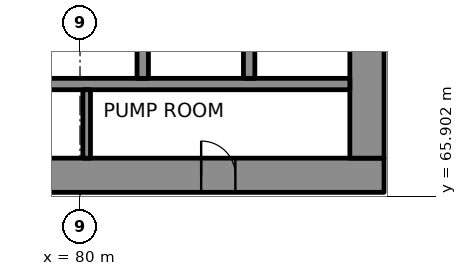
"""IFC4 building model, lengths in metres.
Left out: names, types, materials, properties, quantities, classifications, styles, units other than length and angle.
Written with IfcOpenShell. Run it as: python <this file> out.ifc"""

import sys

from ifc_helpers import new_model, si_unit, direction, frame, frame_2d, origin, place, context, subcontext, project, spatial, rectangle, extrude, element, fill, save


model = new_model("IFC4")
c1 = context("Model", 3, precision=1e-05, world=origin(), true_north=direction((0.0, 1.0)))
c2 = subcontext(c1, "Body", "Model", "MODEL_VIEW")
j1 = project(units=[si_unit("LENGTHUNIT", "METRE"), si_unit("PLANEANGLEUNIT", "RADIAN")], contexts=[c1])
p1 = place(None, origin())
s1 = spatial("IfcSite", under=j1, at=p1, CompositionType="ELEMENT")
p2 = place(p1, origin())
s2 = spatial("IfcBuilding", under=s1, at=p2, CompositionType="ELEMENT")
p3 = place(p2, frame((0.0, 0.0, 8.0)))
s3 = spatial("IfcBuildingStorey", under=s2, at=p3, CompositionType="ELEMENT", Elevation=8.0)
p4 = place(p3, frame((62.0, 66.45, 0.0), z_axis=(0.0, 0.0, 1.0), x_axis=(1.0, 0.0, 0.0)))
e1 = element("IfcWall", 1, at=p4, inside=s3, PredefinedType="SHEAR", context=c2, shape_type="SweptSolid", body=[
    extrude(rectangle(XDim=26.0, YDim=0.9, at=frame_2d((13.0, 0.0))), origin(), (0.0, 0.0, 1.0), 4.3),
])
p5 = place(p4, frame((3.45, 0.0, 0.0)))
e2 = element("IfcOpeningElement", 2, at=p5, cuts=e1, PredefinedType="OPENING", context=c2, shape_type="SweptSolid", body=[
    extrude(rectangle(XDim=0.9, YDim=2.1, at=frame_2d((0.45, 1.05))), frame((0.0, 0.46, 0.0), z_axis=(0.0, -1.0, 0.0), x_axis=(1.0, 0.0, 0.0)), (0.0, 0.0, 1.0), 0.92),
])
p6 = place(p4, frame((6.425, 0.0, 0.0)))
e3 = element("IfcOpeningElement", 3, at=p6, cuts=e1, PredefinedType="OPENING", context=c2, shape_type="SweptSolid", body=[
    extrude(rectangle(XDim=0.9, YDim=2.1, at=frame_2d((0.45, 1.05))), frame((0.0, 0.46, 0.0), z_axis=(0.0, -1.0, 0.0), x_axis=(1.0, 0.0, 0.0)), (0.0, 0.0, 1.0), 0.92),
])
p7 = place(p4, frame((9.4, 0.0, 0.0)))
e4 = element("IfcOpeningElement", 4, at=p7, cuts=e1, PredefinedType="OPENING", context=c2, shape_type="SweptSolid", body=[
    extrude(rectangle(XDim=0.9, YDim=2.1, at=frame_2d((0.45, 1.05))), frame((0.0, 0.46, 0.0), z_axis=(0.0, -1.0, 0.0), x_axis=(1.0, 0.0, 0.0)), (0.0, 0.0, 1.0), 0.92),
])
p8 = place(p4, frame((14.262, 0.0, 0.0)))
e5 = element("IfcOpeningElement", 5, at=p8, cuts=e1, PredefinedType="OPENING", context=c2, shape_type="SweptSolid", body=[
    extrude(rectangle(XDim=0.9, YDim=2.1, at=frame_2d((0.45, 1.05))), frame((0.0, 0.46, 0.0), z_axis=(0.0, -1.0, 0.0), x_axis=(1.0, 0.0, 0.0)), (0.0, 0.0, 1.0), 0.92),
])
p9 = place(p4, frame((21.188, 0.0, 0.0)))
e6 = element("IfcOpeningElement", 6, at=p9, cuts=e1, PredefinedType="OPENING", context=c2, shape_type="SweptSolid", body=[
    extrude(rectangle(XDim=0.9, YDim=2.1, at=frame_2d((0.45, 1.05))), frame((0.0, 0.46, 0.0), z_axis=(0.0, -1.0, 0.0), x_axis=(1.0, 0.0, 0.0)), (0.0, 0.0, 1.0), 0.92),
])
p10 = place(p3, frame((87.55, 66.9, 0.0), z_axis=(0.0, 0.0, 1.0), x_axis=(0.0, 1.0, 0.0)))
e7 = element("IfcWall", 7, at=p10, inside=s3, PredefinedType="SHEAR", context=c2, shape_type="SweptSolid", body=[
    extrude(rectangle(XDim=16.2, YDim=0.9, at=frame_2d((8.1, 0.0))), origin(), (0.0, 0.0, 1.0), 4.3),
])
p11 = place(p10, frame((5.5, 0.0, 0.0)))
e8 = element("IfcOpeningElement", 8, at=p11, cuts=e7, PredefinedType="OPENING", context=c2, shape_type="SweptSolid", body=[
    extrude(rectangle(XDim=1.8, YDim=2.1, at=frame_2d((0.9, 1.05))), frame((0.0, 0.46, 0.0), z_axis=(0.0, -1.0, 0.0), x_axis=(1.0, 0.0, 0.0)), (0.0, 0.0, 1.0), 0.92),
])
p12 = place(p10, frame((11.738, 0.0, 0.0)))
e9 = element("IfcOpeningElement", 9, at=p12, cuts=e7, PredefinedType="OPENING", context=c2, shape_type="SweptSolid", body=[
    extrude(rectangle(XDim=0.9, YDim=2.1, at=frame_2d((0.45, 1.05))), frame((0.0, 0.46, 0.0), z_axis=(0.0, -1.0, 0.0), x_axis=(1.0, 0.0, 0.0)), (0.0, 0.0, 1.0), 0.92),
])
p13 = place(p3, frame((70.35, 68.85, 0.0), z_axis=(0.0, 0.0, 1.0), x_axis=(1.0, 0.0, 0.0)))
e10 = element("IfcWall", 10, at=p13, inside=s3, PredefinedType="SHEAR", context=c2, shape_type="SweptSolid", body=[
    extrude(rectangle(XDim=16.75, YDim=0.3, at=frame_2d((8.375, 0.0))), origin(), (0.0, 0.0, 1.0), 4.3),
])
for number, where, z_axis, x_axis in (
    (11, (81.65, 69.0, 0.0), (0.0, 0.0, 1.0), (0.0, 1.0, 0.0)),
    (12, (84.45, 69.0, 0.0), (0.0, 0.0, 1.0), (0.0, 1.0, 0.0)),
):
    element("IfcWall", number, at=place(p3, frame(where, z_axis=z_axis, x_axis=x_axis)), inside=s3, PredefinedType="SHEAR", context=c2, shape_type="SweptSolid", body=[
        extrude(rectangle(XDim=2.6, YDim=0.3, at=frame_2d((1.3, 0.0))), origin(), (0.0, 0.0, 1.0), 4.3),
    ])
p14 = place(p3, frame((80.175, 66.9, 0.0), z_axis=(0.0, 0.0, 1.0), x_axis=(0.0, 1.0, 0.0)))
e13 = element("IfcWall", 13, at=p14, inside=s3, PredefinedType="PARTITIONING", context=c2, shape_type="SweptSolid", body=[
    extrude(rectangle(XDim=1.8, YDim=0.2, at=frame_2d((0.9, 0.0))), origin(), (0.0, 0.0, 1.0), 4.3),
])
p15 = place(p3, frame((107.106, 62.36, 0.0), z_axis=(0.0, 0.0, 1.0), x_axis=(-0.49999992739, 0.866025445706, 0.0)))
e14 = element("IfcWall", 14, at=p15, inside=s3, PredefinedType="SOLIDWALL", context=c2, shape_type="SweptSolid", body=[
    extrude(rectangle(XDim=54.0, YDim=0.4, at=frame_2d((27.0, 0.0))), origin(), (0.0, 0.0, 1.0), 4.24),
])
p16 = place(p3, frame((112.496, 65.725, 0.0), z_axis=(0.0, 0.0, 1.0), x_axis=(-0.499998673217, 0.866026169802, 0.0)))
e15 = element("IfcWall", 15, at=p16, inside=s3, PredefinedType="PARTITIONING", context=c2, shape_type="SweptSolid", body=[
    extrude(rectangle(XDim=53.48, YDim=0.2, at=frame_2d((26.74, 0.0))), origin(), (0.0, 0.0, 1.0), 4.24),
])
p17 = place(p16, frame((13.08, 0.0, 0.0)))
e16 = element("IfcOpeningElement", 16, at=p17, cuts=e15, PredefinedType="OPENING", context=c2, shape_type="SweptSolid", body=[
    extrude(rectangle(XDim=1.0, YDim=2.1, at=frame_2d((0.5, 1.05))), frame((0.0, 0.11, 0.0), z_axis=(0.0, -1.0, 0.0), x_axis=(1.0, 0.0, 0.0)), (0.0, 0.0, 1.0), 0.22),
])
p18 = place(p16, frame((25.88, 0.0, 0.0)))
e17 = element("IfcOpeningElement", 17, at=p18, cuts=e15, PredefinedType="OPENING", context=c2, shape_type="SweptSolid", body=[
    extrude(rectangle(XDim=1.8, YDim=2.1, at=frame_2d((0.9, 1.05))), frame((0.0, 0.11, 0.0), z_axis=(0.0, -1.0, 0.0), x_axis=(1.0, 0.0, 0.0)), (0.0, 0.0, 1.0), 0.22),
])
p19 = place(p16, frame((50.58, 0.0, 0.0)))
e18 = element("IfcOpeningElement", 18, at=p19, cuts=e15, PredefinedType="OPENING", context=c2, shape_type="SweptSolid", body=[
    extrude(rectangle(XDim=1.0, YDim=2.1, at=frame_2d((0.5, 1.05))), frame((0.0, 0.11, 0.0), z_axis=(0.0, -1.0, 0.0), x_axis=(1.0, 0.0, 0.0)), (0.0, 0.0, 1.0), 0.22),
])
p20 = place(p16, frame((44.28, 0.0, 0.0)))
e19 = element("IfcOpeningElement", 19, at=p20, cuts=e15, PredefinedType="OPENING", context=c2, shape_type="SweptSolid", body=[
    extrude(rectangle(XDim=1.0, YDim=2.1, at=frame_2d((0.5, 1.05))), frame((0.0, 0.11, 0.0), z_axis=(0.0, -1.0, 0.0), x_axis=(1.0, 0.0, 0.0)), (0.0, 0.0, 1.0), 0.22),
])
p21 = place(p9, origin())
e20 = element("IfcDoor", 20, at=p21, inside=s3, OperationType="SINGLE_SWING_LEFT", PredefinedType="DOOR", context=c2, shape_type="SweptSolid", body=[
    extrude(rectangle(XDim=0.9, YDim=2.1, at=frame_2d((0.45, 1.05))), frame((0.0, 0.17, 0.0), z_axis=(0.0, -1.0, 0.0), x_axis=(1.0, 0.0, 0.0)), (0.0, 0.0, 1.0), 0.34),
])
fill(e6, e20)
save(model, sys.argv[1])
